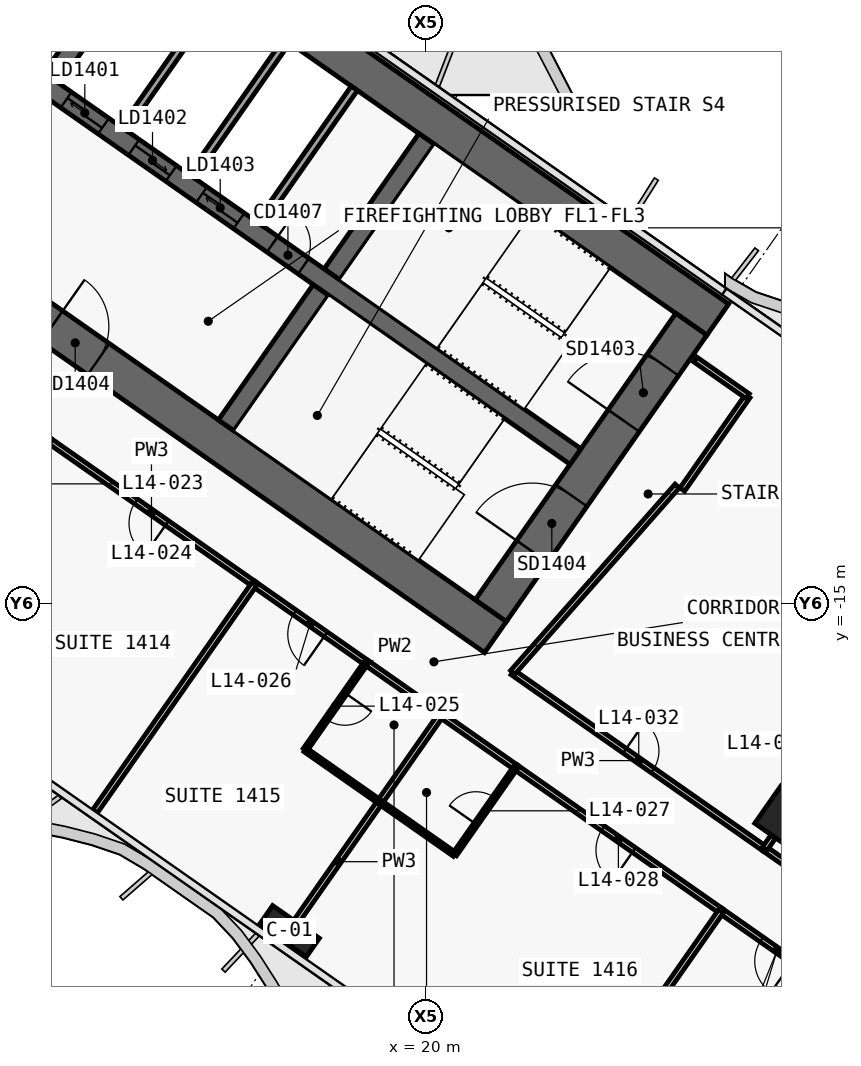
"""IFC4 building model, lengths in metres.
Left out: names, types, materials, properties, quantities, classifications, styles, units other than length and angle.
Written with IfcOpenShell. Run it as: python <this file> out.ifc"""

import sys

from ifc_helpers import new_model, si_unit, direction, frame, frame_2d, origin, origin_2d, place, context, subcontext, project, spatial, polyline, rectangle, outline, extrude, element, fill, save


model = new_model("IFC4")
c1 = context("Model", 3, precision=1e-05, world=origin(), true_north=direction((0.0, 1.0)))
c2 = subcontext(c1, "Body", "Model", "MODEL_VIEW")
j1 = project(units=[si_unit("LENGTHUNIT", "METRE"), si_unit("PLANEANGLEUNIT", "RADIAN")], contexts=[c1])
p1 = place(None, origin())
s1 = spatial("IfcSite", under=j1, at=p1, CompositionType="ELEMENT")
p2 = place(p1, origin())
s2 = spatial("IfcBuilding", under=s1, at=p2, CompositionType="ELEMENT")
p3 = place(p2, frame((0.0, 0.0, 76.1)))
s3 = spatial("IfcBuildingStorey", under=s2, at=p3, CompositionType="ELEMENT", Elevation=76.1)
p4 = place(p3, frame((-0.037, 11.867, 0.0), z_axis=(0.0, 0.0, 1.0), x_axis=(0.819155306259, -0.573571777746, 0.0)))
e1 = element("IfcWall", 1, at=p4, inside=s3, PredefinedType="SHEAR", context=c2, shape_type="SweptSolid", body=[
    extrude(outline(polyline([(33.837, 0.5), (0.0, 0.5), (0.7, -0.5), (33.837, -0.5), (33.837, 0.5)])), origin(), (0.0, 0.0, 1.0), 3.6),
])
p5 = place(p3, frame((-0.037, -0.585, 0.0), z_axis=(0.0, 0.0, 1.0), x_axis=(0.819157152511, -0.573569140985, 0.0)))
e2 = element("IfcWall", 2, at=p5, inside=s3, PredefinedType="SHEAR", context=c2, shape_type="SweptSolid", body=[
    extrude(outline(polyline([(26.695, 0.5), (0.0, 0.5), (0.7, -0.5), (26.695, -0.5), (26.695, 0.5)])), origin(), (0.0, 0.0, 1.0), 3.6),
])
p6 = place(p5, frame((6.695, 0.0, 0.0)))
e3 = element("IfcOpeningElement", 3, at=p6, cuts=e2, PredefinedType="OPENING", context=c2, shape_type="SweptSolid", body=[
    extrude(rectangle(XDim=1.5, YDim=2.1, at=frame_2d((0.75, 1.05))), frame((0.0, 0.51, 0.0), z_axis=(0.0, -1.0, 0.0), x_axis=(1.0, 0.0, 0.0)), (0.0, 0.0, 1.0), 1.02),
])
p7 = place(p5, frame((12.445, 0.0, 0.0)))
e4 = element("IfcOpeningElement", 4, at=p7, cuts=e2, PredefinedType="OPENING", context=c2, shape_type="SweptSolid", body=[
    extrude(rectangle(XDim=1.5, YDim=2.1, at=frame_2d((0.75, 1.05))), frame((0.0, 0.51, 0.0), z_axis=(0.0, -1.0, 0.0), x_axis=(1.0, 0.0, 0.0)), (0.0, 0.0, 1.0), 1.02),
])
p8 = place(p3, frame((21.708, -15.2, 0.0), z_axis=(0.0, 0.0, 1.0), x_axis=(0.573576324356, 0.819152122709, 0.0)))
e5 = element("IfcWall", 5, at=p8, inside=s3, PredefinedType="SHEAR", context=c2, shape_type="SweptSolid", body=[
    extrude(outline(polyline([(9.2, 0.5), (0.0, 0.5), (0.0, -0.5), (9.2, -0.5), (9.2, 0.5)])), origin(), (0.0, 0.0, 1.0), 3.6),
])
p9 = place(p8, frame((6.1, 0.0, 0.0)))
e6 = element("IfcOpeningElement", 6, at=p9, cuts=e5, PredefinedType="OPENING", context=c2, shape_type="SweptSolid", body=[
    extrude(rectangle(XDim=1.8, YDim=2.1, at=frame_2d((0.9, 1.05))), frame((0.0, 0.51, 0.0), z_axis=(0.0, -1.0, 0.0), x_axis=(1.0, 0.0, 0.0)), (0.0, 0.0, 1.0), 1.02),
])
p10 = place(p8, frame((1.9, 0.0, 0.0)))
e7 = element("IfcOpeningElement", 7, at=p10, cuts=e5, PredefinedType="OPENING", context=c2, shape_type="SweptSolid", body=[
    extrude(rectangle(XDim=1.8, YDim=2.1, at=frame_2d((0.9, 1.05))), frame((0.0, 0.51, 0.0), z_axis=(0.0, -1.0, 0.0), x_axis=(1.0, 0.0, 0.0)), (0.0, 0.0, 1.0), 1.02),
])
p11 = place(p3, frame((10.154, -1.189, 0.0), z_axis=(0.0, 0.0, 1.0), x_axis=(0.573594173421, 0.819139624372, 0.0)))
e8 = element("IfcWall", 8, at=p11, inside=s3, PredefinedType="SHEAR", context=c2, shape_type="SweptSolid", body=[
    extrude(outline(polyline([(4.35, -0.25), (4.35, 0.25), (-0.0, 0.25), (-0.0, -0.25), (4.35, -0.25)])), origin(), (0.0, 0.0, 1.0), 3.6),
])
p12 = place(p3, frame((14.745, -10.324, 0.0), z_axis=(0.0, 0.0, 1.0), x_axis=(0.57356780395, 0.819158088694, 0.0)))
e9 = element("IfcWall", 9, at=p12, inside=s3, PredefinedType="SHEAR", context=c2, shape_type="SweptSolid", body=[
    extrude(outline(polyline([(0.0, 0.25), (0.0, -0.25), (4.35, -0.25), (4.35, 0.25), (0.0, 0.25)])), origin(), (0.0, 0.0, 1.0), 3.6),
])
p13 = place(p3, frame((17.527, -6.352, 0.0), z_axis=(0.0, 0.0, 1.0), x_axis=(0.573530143085, 0.819184457233, 0.0)))
e10 = element("IfcWall", 10, at=p13, inside=s3, PredefinedType="SHEAR", context=c2, shape_type="SweptSolid", body=[
    extrude(outline(polyline([(4.35, -0.25), (4.35, 0.25), (0.0, 0.25), (0.0, -0.25), (4.35, -0.25)])), origin(), (0.0, 0.0, 1.0), 3.6),
])
p14 = place(p3, frame((2.638, 3.768, 0.0), z_axis=(0.0, 0.0, 1.0), x_axis=(0.819148977158, -0.573580816643, 0.0)))
e11 = element("IfcWall", 11, at=p14, inside=s3, PredefinedType="SHEAR", context=c2, shape_type="SweptSolid", body=[
    extrude(outline(polyline([(0.0, 0.25), (0.0, -0.25), (26.0, -0.25), (26.0, 0.25), (0.0, 0.25)])), origin(), (0.0, 0.0, 1.0), 3.6),
])
p15 = place(p14, frame((9.637, 0.0, 0.0)))
e12 = element("IfcOpeningElement", 12, at=p15, cuts=e11, PredefinedType="OPENING", context=c2, shape_type="SweptSolid", body=[
    extrude(rectangle(XDim=1.2, YDim=2.1, at=frame_2d((0.6, 1.05))), frame((0.0, 0.26, 0.0), z_axis=(0.0, -1.0, 0.0), x_axis=(1.0, 0.0, 0.0)), (0.0, 0.0, 1.0), 0.52),
])
p16 = place(p14, frame((11.812, 0.0, 0.0)))
e13 = element("IfcOpeningElement", 13, at=p16, cuts=e11, PredefinedType="OPENING", context=c2, shape_type="SweptSolid", body=[
    extrude(rectangle(XDim=1.2, YDim=2.1, at=frame_2d((0.6, 1.05))), frame((0.0, 0.26, 0.0), z_axis=(0.0, -1.0, 0.0), x_axis=(1.0, 0.0, 0.0)), (0.0, 0.0, 1.0), 0.52),
])
p17 = place(p14, frame((13.988, 0.0, 0.0)))
e14 = element("IfcOpeningElement", 14, at=p17, cuts=e11, PredefinedType="OPENING", context=c2, shape_type="SweptSolid", body=[
    extrude(rectangle(XDim=1.2, YDim=2.1, at=frame_2d((0.6, 1.05))), frame((0.0, 0.26, 0.0), z_axis=(0.0, -1.0, 0.0), x_axis=(1.0, 0.0, 0.0)), (0.0, 0.0, 1.0), 0.52),
])
p18 = place(p14, frame((16.262, 0.0, 0.0)))
e15 = element("IfcOpeningElement", 15, at=p18, cuts=e11, PredefinedType="OPENING", context=c2, shape_type="SweptSolid", body=[
    extrude(rectangle(XDim=1.0, YDim=2.1, at=frame_2d((0.5, 1.05))), frame((0.0, 0.26, 0.0), z_axis=(0.0, -1.0, 0.0), x_axis=(1.0, 0.0, 0.0)), (0.0, 0.0, 1.0), 0.52),
])
p19 = place(p3, frame((16.41, -23.637, 0.0), z_axis=(0.0, 0.0, 1.0), x_axis=(0.819152044289, -0.573576436351, 0.0)))
e16 = element("IfcColumn", 16, at=p19, inside=s3, PredefinedType="COLUMN", context=c2, shape_type="SweptSolid", body=[
    extrude(rectangle(XDim=1.5, YDim=0.6, at=origin_2d()), origin(), (0.0, 0.0, 1.0), 3.6),
])
p20 = place(p3, frame((29.49, -20.649, 0.0), z_axis=(0.0, 0.0, 1.0), x_axis=(0.819152044289, -0.573576436351, 0.0)))
e17 = element("IfcColumn", 17, at=p20, inside=s3, PredefinedType="COLUMN", context=c2, shape_type="SweptSolid", body=[
    extrude(rectangle(XDim=1.2, YDim=1.2, at=origin_2d()), origin(), (0.0, 0.0, 1.0), 3.6),
])
p21 = place(p3, frame((12.059, -2.523, 0.0), z_axis=(0.0, 0.0, 1.0), x_axis=(0.573594173421, 0.819139624372, 0.0)))
e18 = element("IfcWall", 18, at=p21, inside=s3, PredefinedType="SOLIDWALL", context=c2, shape_type="SweptSolid", body=[
    extrude(rectangle(XDim=4.35, YDim=0.2, at=frame_2d((2.175, 0.0))), origin(), (0.0, 0.0, 1.0), 3.6),
])
p22 = place(p3, frame((13.84, -3.771, 0.0), z_axis=(0.0, 0.0, 1.0), x_axis=(0.57356780395, 0.819158088694, 0.0)))
e19 = element("IfcWall", 19, at=p22, inside=s3, PredefinedType="SOLIDWALL", context=c2, shape_type="SweptSolid", body=[
    extrude(rectangle(XDim=4.35, YDim=0.2, at=frame_2d((2.175, 0.0))), origin(), (0.0, 0.0, 1.0), 3.6),
])
p23 = place(p3, frame((15.622, -5.018, 0.0), z_axis=(0.0, 0.0, 1.0), x_axis=(0.573594173421, 0.819139624372, 0.0)))
e20 = element("IfcWall", 20, at=p23, inside=s3, PredefinedType="SOLIDWALL", context=c2, shape_type="SweptSolid", body=[
    extrude(rectangle(XDim=4.35, YDim=0.2, at=frame_2d((2.175, 0.0))), origin(), (0.0, 0.0, 1.0), 3.6),
])
p24 = place(p3, frame((22.284, -16.824, 0.0), z_axis=(0.0, 0.0, 1.0), x_axis=(0.819152599934, -0.573575642807, 0.0)))
e21 = element("IfcWall", 21, at=p24, inside=s3, PredefinedType="PARTITIONING", context=c2, shape_type="SweptSolid", body=[
    extrude(rectangle(XDim=8.098, YDim=0.15, at=frame_2d((4.049, 0.0))), origin(), (0.0, 0.0, 1.0), 2.6),
])
p25 = place(p24, frame((3.599, 0.0, 0.0)))
e22 = element("IfcOpeningElement", 22, at=p25, cuts=e21, PredefinedType="OPENING", context=c2, shape_type="SweptSolid", body=[
    extrude(rectangle(XDim=0.9, YDim=2.1, at=frame_2d((0.45, 1.05))), frame((0.0, 0.085, 0.0), z_axis=(0.0, -1.0, 0.0), x_axis=(1.0, 0.0, 0.0)), (0.0, 0.0, 1.0), 0.17),
])
p26 = place(p3, frame((28.914, -21.467, 0.0), z_axis=(0.0, 0.0, 1.0), x_axis=(0.819145961204, -0.573585123798, 0.0)))
e23 = element("IfcWall", 23, at=p26, inside=s3, PredefinedType="PARTITIONING", context=c2, shape_type="SweptSolid", body=[
    extrude(rectangle(XDim=3.603, YDim=0.15, at=frame_2d((1.802, 0.0))), origin(), (0.0, 0.0, 1.0), 2.6),
])
p27 = place(p26, frame((1.502, 0.0, 0.0)))
e24 = element("IfcOpeningElement", 24, at=p27, cuts=e23, PredefinedType="OPENING", context=c2, shape_type="SweptSolid", body=[
    extrude(rectangle(XDim=1.0, YDim=2.1, at=frame_2d((0.5, 1.05))), frame((0.0, 0.085, 0.0), z_axis=(0.0, -1.0, 0.0), x_axis=(1.0, 0.0, 0.0)), (0.0, 0.0, 1.0), 0.17),
])
p28 = place(p3, frame((15.483, -14.504, 0.0), z_axis=(0.0, 0.0, 1.0), x_axis=(-0.819153746897, 0.573574004767, 0.0)))
e25 = element("IfcWall", 25, at=p28, inside=s3, PredefinedType="PARTITIONING", context=c2, shape_type="SweptSolid", body=[
    extrude(rectangle(XDim=6.603, YDim=0.15, at=frame_2d((3.302, 0.0))), origin(), (0.0, 0.0, 1.0), 2.6),
])
p29 = place(p28, frame((2.802, 0.0, 0.0)))
e26 = element("IfcOpeningElement", 26, at=p29, cuts=e25, PredefinedType="OPENING", context=c2, shape_type="SweptSolid", body=[
    extrude(rectangle(XDim=1.0, YDim=2.1, at=frame_2d((0.5, 1.05))), frame((0.0, 0.085, 0.0), z_axis=(0.0, -1.0, 0.0), x_axis=(1.0, 0.0, 0.0)), (0.0, 0.0, 1.0), 0.17),
])
p30 = place(p3, frame((18.431, -16.568, 0.0), z_axis=(0.0, 0.0, 1.0), x_axis=(-0.819145961204, 0.573585123798, 0.0)))
e27 = element("IfcWall", 27, at=p30, inside=s3, PredefinedType="PARTITIONING", context=c2, shape_type="SweptSolid", body=[
    extrude(rectangle(XDim=3.603, YDim=0.15, at=frame_2d((1.802, 0.0))), origin(), (0.0, 0.0, 1.0), 3.32),
])
p31 = place(p30, frame((1.301, 0.0, 0.0)))
e28 = element("IfcOpeningElement", 28, at=p31, cuts=e27, PredefinedType="OPENING", context=c2, shape_type="SweptSolid", body=[
    extrude(rectangle(XDim=1.0, YDim=2.1, at=frame_2d((0.5, 1.05))), frame((0.0, 0.085, 0.0), z_axis=(0.0, -1.0, 0.0), x_axis=(1.0, 0.0, 0.0)), (0.0, 0.0, 1.0), 0.17),
])
p32 = place(p3, frame((20.398, -17.945, 0.0), z_axis=(0.0, 0.0, 1.0), x_axis=(-0.819146032251, 0.573585022335, 0.0)))
e29 = element("IfcWall", 29, at=p32, inside=s3, PredefinedType="PARTITIONING", context=c2, shape_type="SweptSolid", body=[
    extrude(rectangle(XDim=2.404, YDim=0.15, at=frame_2d((1.202, 0.0))), origin(), (0.0, 0.0, 1.0), 2.6),
])
p33 = place(p3, frame((27.771, -23.107, 0.0), z_axis=(0.0, 0.0, 1.0), x_axis=(-0.819153746897, 0.573574004767, 0.0)))
e30 = element("IfcWall", 30, at=p33, inside=s3, PredefinedType="PARTITIONING", context=c2, shape_type="SweptSolid", body=[
    extrude(rectangle(XDim=6.603, YDim=0.15, at=frame_2d((3.302, 0.0))), origin(), (0.0, 0.0, 1.0), 2.6),
])
p34 = place(p33, frame((2.802, 0.0, 0.0)))
e31 = element("IfcOpeningElement", 31, at=p34, cuts=e30, PredefinedType="OPENING", context=c2, shape_type="SweptSolid", body=[
    extrude(rectangle(XDim=1.0, YDim=2.1, at=frame_2d((0.5, 1.05))), frame((0.0, 0.085, 0.0), z_axis=(0.0, -1.0, 0.0), x_axis=(1.0, 0.0, 0.0)), (0.0, 0.0, 1.0), 0.17),
])
p35 = place(p3, frame((22.364, -19.322, 0.0), z_axis=(0.0, 0.0, 1.0), x_axis=(-0.819146032251, 0.573585022335, 0.0)))
e32 = element("IfcWall", 32, at=p35, inside=s3, PredefinedType="PARTITIONING", context=c2, shape_type="SweptSolid", body=[
    extrude(rectangle(XDim=2.404, YDim=0.15, at=frame_2d((1.202, 0.0))), origin(), (0.0, 0.0, 1.0), 2.6),
])
p36 = place(p3, frame((30.719, -25.172, 0.0), z_axis=(0.0, 0.0, 1.0), x_axis=(-0.819145961204, 0.573585123798, 0.0)))
e33 = element("IfcWall", 33, at=p36, inside=s3, PredefinedType="PARTITIONING", context=c2, shape_type="SweptSolid", body=[
    extrude(rectangle(XDim=3.603, YDim=0.15, at=frame_2d((1.802, 0.0))), origin(), (0.0, 0.0, 1.0), 2.6),
])
p37 = place(p36, frame((1.301, 0.0, 0.0)))
e34 = element("IfcOpeningElement", 34, at=p37, cuts=e33, PredefinedType="OPENING", context=c2, shape_type="SweptSolid", body=[
    extrude(rectangle(XDim=1.0, YDim=2.1, at=frame_2d((0.5, 1.05))), frame((0.0, 0.085, 0.0), z_axis=(0.0, -1.0, 0.0), x_axis=(1.0, 0.0, 0.0)), (0.0, 0.0, 1.0), 0.17),
])
p38 = place(p3, frame((29.134, -21.156, 0.0), z_axis=(0.0, 0.0, 1.0), x_axis=(-0.572944929411, -0.819593867633, 0.0)))
e35 = element("IfcWall", 35, at=p38, inside=s3, PredefinedType="PARTITIONING", context=c2, shape_type="SweptSolid", body=[
    extrude(rectangle(XDim=0.38, YDim=0.15, at=frame_2d((0.19, 0.0))), origin(), (0.0, 0.0, 1.0), 2.6),
])
p39 = place(p3, frame((22.285, -16.825, 0.0), z_axis=(0.0, 0.0, 1.0), x_axis=(0.661551268245, 0.749899939647, 0.0)))
e36 = element("IfcWall", 36, at=p39, inside=s3, PredefinedType="PARTITIONING", context=c2, shape_type="SweptSolid", body=[
    extrude(rectangle(XDim=6.541, YDim=0.15, at=frame_2d((3.271, 0.0))), origin(), (0.0, 0.0, 1.0), 2.6),
])
p40 = place(p3, frame((26.746, -12.014, 0.0), z_axis=(0.0, 0.0, 1.0), x_axis=(0.573560650686, 0.819163097304, 0.0)))
e37 = element("IfcWall", 37, at=p40, inside=s3, PredefinedType="PARTITIONING", context=c2, shape_type="SweptSolid", body=[
    extrude(rectangle(XDim=3.0, YDim=0.15, at=frame_2d((1.5, 0.0))), origin(), (0.0, 0.0, 1.0), 3.32),
])
p41 = place(p3, frame((28.467, -9.556, 0.0), z_axis=(0.0, 0.0, 1.0), x_axis=(-0.819109000826, 0.573637903879, 0.0)))
e38 = element("IfcWall", 38, at=p41, inside=s3, PredefinedType="PARTITIONING", context=c2, shape_type="SweptSolid", body=[
    extrude(rectangle(XDim=1.68, YDim=0.15, at=frame_2d((0.84, 0.0))), origin(), (0.0, 0.0, 1.0), 3.32),
])
p42 = place(p3, frame((15.481, -14.503, 0.0), z_axis=(0.0, 0.0, 1.0), x_axis=(-0.573572324301, -0.819154923562, 0.0)))
e39 = element("IfcWall", 39, at=p42, inside=s3, PredefinedType="PARTITIONING", context=c2, shape_type="SweptSolid", body=[
    extrude(rectangle(XDim=7.3, YDim=0.15, at=frame_2d((3.65, 0.0))), origin(), (0.0, 0.0, 1.0), 2.5),
])
p43 = place(p3, frame((18.43, -16.567, 0.0), z_axis=(0.0, 0.0, 1.0), x_axis=(-0.573608623498, -0.819129505664, 0.0)))
e40 = element("IfcWall", 40, at=p43, inside=s3, PredefinedType="PARTITIONING", context=c2, shape_type="SweptSolid", body=[
    extrude(rectangle(XDim=2.8, YDim=0.12, at=frame_2d((1.4, 0.0))), origin(), (0.0, 0.0, 1.0), 3.32),
])
p44 = place(p43, frame((0.975, 0.0, 0.0)))
e41 = element("IfcOpeningElement", 41, at=p44, cuts=e40, PredefinedType="OPENING", context=c2, shape_type="SweptSolid", body=[
    extrude(rectangle(XDim=0.85, YDim=2.05, at=frame_2d((0.425, 1.025))), frame((0.0, 0.07, 0.0), z_axis=(0.0, -1.0, 0.0), x_axis=(1.0, 0.0, 0.0)), (0.0, 0.0, 1.0), 0.14),
])
p45 = place(p3, frame((16.824, -18.862, 0.0), z_axis=(0.0, 0.0, 1.0), x_axis=(0.819141114317, -0.573592045652, 0.0)))
e42 = element("IfcWall", 42, at=p45, inside=s3, PredefinedType="PARTITIONING", context=c2, shape_type="SweptSolid", body=[
    extrude(rectangle(XDim=2.4, YDim=0.12, at=frame_2d((1.2, 0.0))), origin(), (0.0, 0.0, 1.0), 2.6),
])
p46 = place(p3, frame((18.79, -20.239, 0.0), z_axis=(0.0, 0.0, 1.0), x_axis=(-0.573594994199, -0.819139049631, 0.0)))
e43 = element("IfcWall", 43, at=p46, inside=s3, PredefinedType="PARTITIONING", context=c2, shape_type="SweptSolid", body=[
    extrude(rectangle(XDim=3.829, YDim=0.15, at=frame_2d((1.915, 0.0))), origin(), (0.0, 0.0, 1.0), 2.6),
])
p47 = place(p3, frame((20.396, -17.944, 0.0), z_axis=(0.0, 0.0, 1.0), x_axis=(-0.57364959175, -0.819100815459, 0.0)))
e44 = element("IfcWall", 44, at=p47, inside=s3, PredefinedType="PARTITIONING", context=c2, shape_type="SweptSolid", body=[
    extrude(rectangle(XDim=2.8, YDim=0.15, at=frame_2d((1.4, 0.0))), origin(), (0.0, 0.0, 1.0), 2.6),
])
p48 = place(p3, frame((18.79, -20.239, 0.0), z_axis=(0.0, 0.0, 1.0), x_axis=(0.819188907105, -0.573523787192, 0.0)))
e45 = element("IfcWall", 45, at=p48, inside=s3, PredefinedType="PARTITIONING", context=c2, shape_type="SweptSolid", body=[
    extrude(rectangle(XDim=2.4, YDim=0.12, at=frame_2d((1.2, 0.0))), origin(), (0.0, 0.0, 1.0), 2.6),
])
p49 = place(p3, frame((20.757, -21.615, 0.0), z_axis=(0.0, 0.0, 1.0), x_axis=(0.57364959175, 0.819100815459, 0.0)))
e46 = element("IfcWall", 46, at=p49, inside=s3, PredefinedType="PARTITIONING", context=c2, shape_type="SweptSolid", body=[
    extrude(rectangle(XDim=2.8, YDim=0.12, at=frame_2d((1.4, 0.0))), origin(), (0.0, 0.0, 1.0), 3.32),
])
p50 = place(p49, frame((0.975, 0.0, 0.0)))
e47 = element("IfcOpeningElement", 47, at=p50, cuts=e46, PredefinedType="OPENING", context=c2, shape_type="SweptSolid", body=[
    extrude(rectangle(XDim=0.85, YDim=2.05, at=frame_2d((0.425, 1.025))), frame((0.0, 0.07, 0.0), z_axis=(0.0, -1.0, 0.0), x_axis=(1.0, 0.0, 0.0)), (0.0, 0.0, 1.0), 0.14),
])
p51 = place(p3, frame((27.769, -23.106, 0.0), z_axis=(0.0, 0.0, 1.0), x_axis=(-0.57359826181, -0.819136761505, 0.0)))
e48 = element("IfcWall", 48, at=p51, inside=s3, PredefinedType="PARTITIONING", context=c2, shape_type="SweptSolid", body=[
    extrude(rectangle(XDim=6.63, YDim=0.15, at=frame_2d((3.315, 0.0))), origin(), (0.0, 0.0, 1.0), 2.6),
])
p52 = place(p15, origin())
e49 = element("IfcDoor", 49, at=p52, inside=s3, OperationType="SLIDING_TO_LEFT", PredefinedType="DOOR", context=c2, shape_type="SweptSolid", body=[
    extrude(rectangle(XDim=1.2, YDim=2.1, at=frame_2d((0.6, 1.05))), frame((0.0, 0.025, 0.0), z_axis=(0.0, -1.0, 0.0), x_axis=(1.0, 0.0, 0.0)), (0.0, 0.0, 1.0), 0.05),
])
fill(e12, e49)
p53 = place(p16, origin())
e50 = element("IfcDoor", 50, at=p53, inside=s3, OperationType="SLIDING_TO_RIGHT", PredefinedType="DOOR", context=c2, shape_type="SweptSolid", body=[
    extrude(rectangle(XDim=1.2, YDim=2.1, at=frame_2d((0.6, 1.05))), frame((0.0, 0.025, 0.0), z_axis=(0.0, -1.0, 0.0), x_axis=(1.0, 0.0, 0.0)), (0.0, 0.0, 1.0), 0.05),
])
fill(e13, e50)
p54 = place(p17, origin())
e51 = element("IfcDoor", 51, at=p54, inside=s3, OperationType="SLIDING_TO_LEFT", PredefinedType="DOOR", context=c2, shape_type="SweptSolid", body=[
    extrude(rectangle(XDim=1.2, YDim=2.1, at=frame_2d((0.6, 1.05))), frame((0.0, 0.025, 0.0), z_axis=(0.0, -1.0, 0.0), x_axis=(1.0, 0.0, 0.0)), (0.0, 0.0, 1.0), 0.05),
])
fill(e14, e51)
p55 = place(p18, origin())
e52 = element("IfcDoor", 52, at=p55, inside=s3, OperationType="SINGLE_SWING_RIGHT", PredefinedType="DOOR", context=c2, shape_type="SweptSolid", body=[
    extrude(rectangle(XDim=1.0, YDim=2.1, at=frame_2d((0.5, 1.05))), frame((0.0, 0.025, 0.0), z_axis=(0.0, -1.0, 0.0), x_axis=(1.0, 0.0, 0.0)), (0.0, 0.0, 1.0), 0.05),
])
fill(e15, e52)
p56 = place(p7, origin())
e53 = element("IfcDoor", 53, at=p56, inside=s3, OperationType="DOUBLE_DOOR_SINGLE_SWING", PredefinedType="DOOR", context=c2, shape_type="SweptSolid", body=[
    extrude(rectangle(XDim=1.5, YDim=2.1, at=frame_2d((0.75, 1.05))), frame((0.0, 0.025, 0.0), z_axis=(0.0, -1.0, 0.0), x_axis=(1.0, 0.0, 0.0)), (0.0, 0.0, 1.0), 0.05),
])
fill(e4, e53)
p57 = place(p9, origin())
e54 = element("IfcDoor", 54, at=p57, inside=s3, OperationType="DOUBLE_DOOR_SINGLE_SWING", PredefinedType="DOOR", context=c2, shape_type="SweptSolid", body=[
    extrude(rectangle(XDim=1.8, YDim=2.1, at=frame_2d((0.9, 1.05))), frame((0.0, 0.025, 0.0), z_axis=(0.0, -1.0, 0.0), x_axis=(1.0, 0.0, 0.0)), (0.0, 0.0, 1.0), 0.05),
])
fill(e6, e54)
p58 = place(p10, origin())
e55 = element("IfcDoor", 55, at=p58, inside=s3, OperationType="DOUBLE_DOOR_SINGLE_SWING", PredefinedType="DOOR", context=c2, shape_type="SweptSolid", body=[
    extrude(rectangle(XDim=1.8, YDim=2.1, at=frame_2d((0.9, 1.05))), frame((0.0, 0.025, 0.0), z_axis=(0.0, -1.0, 0.0), x_axis=(1.0, 0.0, 0.0)), (0.0, 0.0, 1.0), 0.05),
])
fill(e7, e55)
p59 = place(p29, origin())
e56 = element("IfcDoor", 56, at=p59, inside=s3, OperationType="SINGLE_SWING_LEFT", PredefinedType="DOOR", context=c2, shape_type="SweptSolid", body=[
    extrude(rectangle(XDim=1.0, YDim=2.1, at=frame_2d((0.5, 1.05))), frame((0.0, 0.025, 0.0), z_axis=(0.0, -1.0, 0.0), x_axis=(1.0, 0.0, 0.0)), (0.0, 0.0, 1.0), 0.05),
])
fill(e26, e56)
p60 = place(p44, origin())
e57 = element("IfcDoor", 57, at=p60, inside=s3, OperationType="SINGLE_SWING_LEFT", PredefinedType="DOOR", context=c2, shape_type="SweptSolid", body=[
    extrude(rectangle(XDim=0.85, YDim=2.05, at=frame_2d((0.425, 1.025))), frame((0.0, 0.025, 0.0), z_axis=(0.0, -1.0, 0.0), x_axis=(1.0, 0.0, 0.0)), (0.0, 0.0, 1.0), 0.05),
])
fill(e41, e57)
p61 = place(p31, origin())
e58 = element("IfcDoor", 58, at=p61, inside=s3, OperationType="SINGLE_SWING_RIGHT", PredefinedType="DOOR", context=c2, shape_type="SweptSolid", body=[
    extrude(rectangle(XDim=1.0, YDim=2.1, at=frame_2d((0.5, 1.05))), frame((0.0, 0.025, 0.0), z_axis=(0.0, -1.0, 0.0), x_axis=(1.0, 0.0, 0.0)), (0.0, 0.0, 1.0), 0.05),
])
fill(e28, e58)
p62 = place(p50, origin())
e59 = element("IfcDoor", 59, at=p62, inside=s3, OperationType="SINGLE_SWING_LEFT", PredefinedType="DOOR", context=c2, shape_type="SweptSolid", body=[
    extrude(rectangle(XDim=0.85, YDim=2.05, at=frame_2d((0.425, 1.025))), frame((0.0, 0.025, 0.0), z_axis=(0.0, -1.0, 0.0), x_axis=(1.0, 0.0, 0.0)), (0.0, 0.0, 1.0), 0.05),
])
fill(e47, e59)
p63 = place(p34, origin())
e60 = element("IfcDoor", 60, at=p63, inside=s3, OperationType="SINGLE_SWING_LEFT", PredefinedType="DOOR", context=c2, shape_type="SweptSolid", body=[
    extrude(rectangle(XDim=1.0, YDim=2.1, at=frame_2d((0.5, 1.05))), frame((0.0, 0.025, 0.0), z_axis=(0.0, -1.0, 0.0), x_axis=(1.0, 0.0, 0.0)), (0.0, 0.0, 1.0), 0.05),
])
fill(e31, e60)
p64 = place(p37, origin())
e61 = element("IfcDoor", 61, at=p64, inside=s3, OperationType="SINGLE_SWING_RIGHT", PredefinedType="DOOR", context=c2, shape_type="SweptSolid", body=[
    extrude(rectangle(XDim=1.0, YDim=2.1, at=frame_2d((0.5, 1.05))), frame((0.0, 0.025, 0.0), z_axis=(0.0, -1.0, 0.0), x_axis=(1.0, 0.0, 0.0)), (0.0, 0.0, 1.0), 0.05),
])
fill(e34, e61)
p65 = place(p25, origin())
e62 = element("IfcDoor", 62, at=p65, inside=s3, OperationType="SINGLE_SWING_RIGHT", PredefinedType="DOOR", context=c2, shape_type="SweptSolid", body=[
    extrude(rectangle(XDim=0.9, YDim=2.1, at=frame_2d((0.45, 1.05))), frame((0.0, 0.025, 0.0), z_axis=(0.0, -1.0, 0.0), x_axis=(1.0, 0.0, 0.0)), (0.0, 0.0, 1.0), 0.05),
])
fill(e22, e62)
save(model, sys.argv[1])
